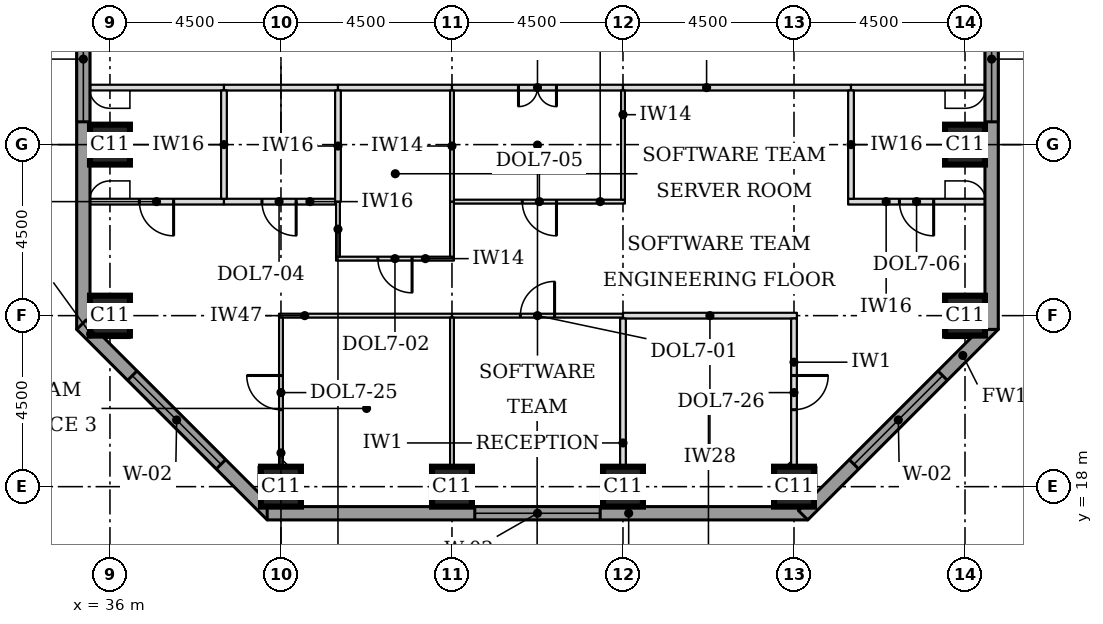
"""IFC4 building model, lengths in metres.
Left out: names, types, materials, properties, quantities, classifications, styles, units other than length and angle.
Written with IfcOpenShell. Run it as: python <this file> out.ifc"""

import sys

from ifc_helpers import new_model, si_unit, direction, frame, frame_2d, origin, origin_2d, place, context, subcontext, project, spatial, rectangle, extrude, element, fill, save


model = new_model("IFC4")
c1 = context("Model", 3, precision=1e-05, world=origin(), true_north=direction((0.0, 1.0)))
c2 = subcontext(c1, "Body", "Model", "MODEL_VIEW")
j1 = project(units=[si_unit("LENGTHUNIT", "METRE"), si_unit("PLANEANGLEUNIT", "RADIAN")], contexts=[c1])
p1 = place(None, origin())
s1 = spatial("IfcSite", under=j1, at=p1, CompositionType="ELEMENT")
p2 = place(p1, origin())
s2 = spatial("IfcBuilding", under=s1, at=p2, CompositionType="ELEMENT")
p3 = place(p2, frame((0.0, 0.0, 130.7)))
s3 = spatial("IfcBuildingStorey", under=s2, at=p3, CompositionType="ELEMENT", Elevation=130.7)
for number, where, z_axis, x_axis in (
    (1, (40.5, 18.0, 0.0), (0.0, 0.0, 1.0), (1.0, 0.0, 0.0)),
    (2, (45.0, 18.0, 0.0), (0.0, 0.0, 1.0), (1.0, 0.0, 0.0)),
    (3, (49.5, 18.0, 0.0), (0.0, 0.0, 1.0), (1.0, 0.0, 0.0)),
    (4, (54.0, 18.0, 0.0), (0.0, 0.0, 1.0), (1.0, 0.0, 0.0)),
    (5, (36.0, 22.5, 0.0), (0.0, 0.0, 1.0), (1.0, 0.0, 0.0)),
    (6, (58.5, 22.5, 0.0), (0.0, 0.0, 1.0), (1.0, 0.0, 0.0)),
    (7, (36.0, 27.0, 0.0), (0.0, 0.0, 1.0), (1.0, 0.0, 0.0)),
    (8, (58.5, 27.0, 0.0), (0.0, 0.0, 1.0), (1.0, 0.0, 0.0)),
):
    element("IfcColumn", number, at=place(p3, frame(where, z_axis=z_axis, x_axis=x_axis)), inside=s3, PredefinedType="COLUMN", context=c2, shape_type="SweptSolid", body=[
        extrude(rectangle(XDim=1.05, YDim=1.05, at=origin_2d()), origin(), (0.0, 0.0, 1.0), 3.7),
    ])
p4 = place(p3, frame((35.3, 39.975, 0.0), z_axis=(0.0, 0.0, 1.0), x_axis=(0.0, -1.0, 0.0)))
e9 = element("IfcWall", 9, at=p4, inside=s3, PredefinedType="STANDARD", context=c2, shape_type="SweptSolid", body=[
    extrude(rectangle(XDim=17.837, YDim=0.35, at=frame_2d((8.919, 0.0))), origin(), (0.0, 0.0, 1.0), 3.525),
])
p5 = place(p4, frame((0.5, 0.0, 0.9)))
e10 = element("IfcOpeningElement", 10, at=p5, cuts=e9, PredefinedType="OPENING", context=c2, shape_type="SweptSolid", body=[
    extrude(rectangle(XDim=3.3, YDim=1.9, at=frame_2d((1.65, 0.95))), frame((0.0, 0.185, 0.0), z_axis=(0.0, -1.0, 0.0), x_axis=(1.0, 0.0, 0.0)), (0.0, 0.0, 1.0), 0.37),
])
p6 = place(p4, frame((9.075, 0.0, 0.9)))
e11 = element("IfcOpeningElement", 11, at=p6, cuts=e9, PredefinedType="OPENING", context=c2, shape_type="SweptSolid", body=[
    extrude(rectangle(XDim=3.3, YDim=1.9, at=frame_2d((1.65, 0.95))), frame((0.0, 0.185, 0.0), z_axis=(0.0, -1.0, 0.0), x_axis=(1.0, 0.0, 0.0)), (0.0, 0.0, 1.0), 0.37),
])
p7 = place(p3, frame((35.249, 22.261, 0.0), z_axis=(0.0, 0.0, 1.0), x_axis=(0.707106781187, -0.707106781187, 0.0)))
e12 = element("IfcWall", 12, at=p7, inside=s3, PredefinedType="STANDARD", context=c2, shape_type="SweptSolid", body=[
    extrude(rectangle(XDim=7.089, YDim=0.35, at=frame_2d((3.544, 0.0))), origin(), (0.0, 0.0, 1.0), 3.525),
])
p8 = place(p7, frame((1.894, 0.0, 0.9)))
e13 = element("IfcOpeningElement", 13, at=p8, cuts=e12, PredefinedType="OPENING", context=c2, shape_type="SweptSolid", body=[
    extrude(rectangle(XDim=3.3, YDim=1.9, at=frame_2d((1.65, 0.95))), frame((0.0, 0.185, 0.0), z_axis=(0.0, -1.0, 0.0), x_axis=(1.0, 0.0, 0.0)), (0.0, 0.0, 1.0), 0.37),
])
p9 = place(p3, frame((40.138, 17.3, 0.0), z_axis=(0.0, 0.0, 1.0), x_axis=(1.0, 0.0, 0.0)))
e14 = element("IfcWall", 14, at=p9, inside=s3, PredefinedType="STANDARD", context=c2, shape_type="SweptSolid", body=[
    extrude(rectangle(XDim=14.225, YDim=0.35, at=frame_2d((7.112, 0.0))), origin(), (0.0, 0.0, 1.0), 3.525),
])
p10 = place(p9, frame((5.462, 0.0, 0.9)))
e15 = element("IfcOpeningElement", 15, at=p10, cuts=e14, PredefinedType="OPENING", context=c2, shape_type="SweptSolid", body=[
    extrude(rectangle(XDim=3.3, YDim=1.9, at=frame_2d((1.65, 0.95))), frame((0.0, 0.185, 0.0), z_axis=(0.0, -1.0, 0.0), x_axis=(1.0, 0.0, 0.0)), (0.0, 0.0, 1.0), 0.37),
])
p11 = place(p3, frame((54.239, 17.249, 0.0), z_axis=(0.0, 0.0, 1.0), x_axis=(0.707106781187, 0.707106781187, 0.0)))
e16 = element("IfcWall", 16, at=p11, inside=s3, PredefinedType="STANDARD", context=c2, shape_type="SweptSolid", body=[
    extrude(rectangle(XDim=7.089, YDim=0.35, at=frame_2d((3.544, 0.0))), origin(), (0.0, 0.0, 1.0), 3.525),
])
p12 = place(p11, frame((1.894, 0.0, 0.9)))
e17 = element("IfcOpeningElement", 17, at=p12, cuts=e16, PredefinedType="OPENING", context=c2, shape_type="SweptSolid", body=[
    extrude(rectangle(XDim=3.3, YDim=1.9, at=frame_2d((1.65, 0.95))), frame((0.0, 0.185, 0.0), z_axis=(0.0, -1.0, 0.0), x_axis=(1.0, 0.0, 0.0)), (0.0, 0.0, 1.0), 0.37),
])
p13 = place(p3, frame((59.2, 22.138, 0.0), z_axis=(0.0, 0.0, 1.0), x_axis=(0.0, 1.0, 0.0)))
e18 = element("IfcWall", 18, at=p13, inside=s3, PredefinedType="STANDARD", context=c2, shape_type="SweptSolid", body=[
    extrude(rectangle(XDim=17.837, YDim=0.35, at=frame_2d((8.919, 0.0))), origin(), (0.0, 0.0, 1.0), 3.525),
])
p14 = place(p13, frame((5.462, 0.0, 0.9)))
e19 = element("IfcOpeningElement", 19, at=p14, cuts=e18, PredefinedType="OPENING", context=c2, shape_type="SweptSolid", body=[
    extrude(rectangle(XDim=3.3, YDim=1.9, at=frame_2d((1.65, 0.95))), frame((0.0, 0.185, 0.0), z_axis=(0.0, -1.0, 0.0), x_axis=(1.0, 0.0, 0.0)), (0.0, 0.0, 1.0), 0.37),
])
p15 = place(p13, frame((14.037, 0.0, 0.9)))
e20 = element("IfcOpeningElement", 20, at=p15, cuts=e18, PredefinedType="OPENING", context=c2, shape_type="SweptSolid", body=[
    extrude(rectangle(XDim=3.3, YDim=1.9, at=frame_2d((1.65, 0.95))), frame((0.0, 0.185, 0.0), z_axis=(0.0, -1.0, 0.0), x_axis=(1.0, 0.0, 0.0)), (0.0, 0.0, 1.0), 0.37),
])
p16 = place(p3, frame((40.45, 22.5, 0.0), z_axis=(0.0, 0.0, 1.0), x_axis=(1.0, 0.0, 0.0)))
e21 = element("IfcWall", 21, at=p16, inside=s3, PredefinedType="PARTITIONING", context=c2, shape_type="SweptSolid", body=[
    extrude(rectangle(XDim=4.55, YDim=0.1, at=frame_2d((2.275, 0.0))), origin(), (0.0, 0.0, 1.0), 2.55),
])
p17 = place(p3, frame((45.0, 22.5, 0.0), z_axis=(0.0, 0.0, 1.0), x_axis=(1.0, 0.0, 0.0)))
e22 = element("IfcWall", 22, at=p17, inside=s3, PredefinedType="PARTITIONING", context=c2, shape_type="SweptSolid", body=[
    extrude(rectangle(XDim=4.5, YDim=0.1, at=frame_2d((2.25, 0.0))), origin(), (0.0, 0.0, 1.0), 2.55),
])
p18 = place(p17, frame((1.8, 0.0, 0.0)))
e23 = element("IfcOpeningElement", 23, at=p18, cuts=e22, PredefinedType="OPENING", context=c2, shape_type="SweptSolid", body=[
    extrude(rectangle(XDim=0.9, YDim=2.1, at=frame_2d((0.45, 1.05))), frame((0.0, 0.06, 0.0), z_axis=(0.0, -1.0, 0.0), x_axis=(1.0, 0.0, 0.0)), (0.0, 0.0, 1.0), 0.12),
])
p19 = place(p3, frame((49.5, 22.5, 0.0), z_axis=(0.0, 0.0, 1.0), x_axis=(1.0, 0.0, 0.0)))
e24 = element("IfcWall", 24, at=p19, inside=s3, PredefinedType="PARTITIONING", context=c2, shape_type="SweptSolid", body=[
    extrude(rectangle(XDim=4.575, YDim=0.15, at=frame_2d((2.288, 0.0))), origin(), (0.0, 0.0, 1.0), 2.55),
])
p20 = place(p3, frame((41.95, 24.0, 0.0), z_axis=(0.0, 0.0, 1.0), x_axis=(1.0, 0.0, 0.0)))
e25 = element("IfcWall", 25, at=p20, inside=s3, PredefinedType="PARTITIONING", context=c2, shape_type="SweptSolid", body=[
    extrude(rectangle(XDim=3.1, YDim=0.1, at=frame_2d((1.55, 0.0))), origin(), (0.0, 0.0, 1.0), 3.55),
])
p21 = place(p20, frame((1.1, 0.0, 0.0)))
e26 = element("IfcOpeningElement", 26, at=p21, cuts=e25, PredefinedType="OPENING", context=c2, shape_type="SweptSolid", body=[
    extrude(rectangle(XDim=0.9, YDim=2.1, at=frame_2d((0.45, 1.05))), frame((0.0, 0.06, 0.0), z_axis=(0.0, -1.0, 0.0), x_axis=(1.0, 0.0, 0.0)), (0.0, 0.0, 1.0), 0.12),
])
p22 = place(p3, frame((35.475, 25.5, 0.0), z_axis=(0.0, 0.0, 1.0), x_axis=(1.0, 0.0, 0.0)))
e27 = element("IfcWall", 27, at=p22, inside=s3, PredefinedType="PARTITIONING", context=c2, shape_type="SweptSolid", body=[
    extrude(rectangle(XDim=3.525, YDim=0.15, at=frame_2d((1.762, 0.0))), origin(), (0.0, 0.0, 1.0), 3.55),
])
p23 = place(p22, frame((1.3, 0.0, 0.0)))
e28 = element("IfcOpeningElement", 28, at=p23, cuts=e27, PredefinedType="OPENING", context=c2, shape_type="SweptSolid", body=[
    extrude(rectangle(XDim=0.9, YDim=2.1, at=frame_2d((0.45, 1.05))), frame((0.0, 0.085, 0.0), z_axis=(0.0, -1.0, 0.0), x_axis=(1.0, 0.0, 0.0)), (0.0, 0.0, 1.0), 0.17),
])
p24 = place(p3, frame((39.0, 25.5, 0.0), z_axis=(0.0, 0.0, 1.0), x_axis=(1.0, 0.0, 0.0)))
e29 = element("IfcWall", 29, at=p24, inside=s3, PredefinedType="PARTITIONING", context=c2, shape_type="SweptSolid", body=[
    extrude(rectangle(XDim=2.925, YDim=0.15, at=frame_2d((1.462, 0.0))), origin(), (0.0, 0.0, 1.0), 3.55),
])
p25 = place(p24, frame((1.0, 0.0, 0.0)))
e30 = element("IfcOpeningElement", 30, at=p25, cuts=e29, PredefinedType="OPENING", context=c2, shape_type="SweptSolid", body=[
    extrude(rectangle(XDim=0.9, YDim=2.1, at=frame_2d((0.45, 1.05))), frame((0.0, 0.085, 0.0), z_axis=(0.0, -1.0, 0.0), x_axis=(1.0, 0.0, 0.0)), (0.0, 0.0, 1.0), 0.17),
])
p26 = place(p3, frame((45.05, 25.5, 0.0), z_axis=(0.0, 0.0, 1.0), x_axis=(1.0, 0.0, 0.0)))
e31 = element("IfcWall", 31, at=p26, inside=s3, PredefinedType="PARTITIONING", context=c2, shape_type="SweptSolid", body=[
    extrude(rectangle(XDim=4.5, YDim=0.1, at=frame_2d((2.25, 0.0))), origin(), (0.0, 0.0, 1.0), 3.55),
])
p27 = place(p26, frame((1.8, 0.0, 0.0)))
e32 = element("IfcOpeningElement", 32, at=p27, cuts=e31, PredefinedType="OPENING", context=c2, shape_type="SweptSolid", body=[
    extrude(rectangle(XDim=0.9, YDim=2.1, at=frame_2d((0.45, 1.05))), frame((0.0, 0.06, 0.0), z_axis=(0.0, -1.0, 0.0), x_axis=(1.0, 0.0, 0.0)), (0.0, 0.0, 1.0), 0.12),
])
p28 = place(p3, frame((55.425, 25.5, 0.0), z_axis=(0.0, 0.0, 1.0), x_axis=(1.0, 0.0, 0.0)))
e33 = element("IfcWall", 33, at=p28, inside=s3, PredefinedType="PARTITIONING", context=c2, shape_type="SweptSolid", body=[
    extrude(rectangle(XDim=3.6, YDim=0.15, at=frame_2d((1.8, 0.0))), origin(), (0.0, 0.0, 1.0), 3.55),
])
p29 = place(p28, frame((1.35, 0.0, 0.0)))
e34 = element("IfcOpeningElement", 34, at=p29, cuts=e33, PredefinedType="OPENING", context=c2, shape_type="SweptSolid", body=[
    extrude(rectangle(XDim=0.9, YDim=2.1, at=frame_2d((0.45, 1.05))), frame((0.0, 0.085, 0.0), z_axis=(0.0, -1.0, 0.0), x_axis=(1.0, 0.0, 0.0)), (0.0, 0.0, 1.0), 0.17),
])
p30 = place(p3, frame((35.475, 28.5, 0.0), z_axis=(0.0, 0.0, 1.0), x_axis=(1.0, 0.0, 0.0)))
e35 = element("IfcWall", 35, at=p30, inside=s3, PredefinedType="PARTITIONING", context=c2, shape_type="SweptSolid", body=[
    extrude(rectangle(XDim=3.525, YDim=0.15, at=frame_2d((1.762, 0.0))), origin(), (0.0, 0.0, 1.0), 3.55),
])
for number, where, z_axis, x_axis in (
    (36, (39.0, 28.5, 0.0), (0.0, 0.0, 1.0), (1.0, 0.0, 0.0)),
    (37, (42.0, 28.5, 0.0), (0.0, 0.0, 1.0), (1.0, 0.0, 0.0)),
):
    element("IfcWall", number, at=place(p3, frame(where, z_axis=z_axis, x_axis=x_axis)), inside=s3, PredefinedType="PARTITIONING", context=c2, shape_type="SweptSolid", body=[
        extrude(rectangle(XDim=3.0, YDim=0.15, at=frame_2d((1.5, 0.0))), origin(), (0.0, 0.0, 1.0), 3.55),
    ])
p31 = place(p3, frame((45.0, 28.5, 0.0), z_axis=(0.0, 0.0, 1.0), x_axis=(1.0, 0.0, 0.0)))
e38 = element("IfcWall", 38, at=p31, inside=s3, PredefinedType="PARTITIONING", context=c2, shape_type="SweptSolid", body=[
    extrude(rectangle(XDim=4.5, YDim=0.15, at=frame_2d((2.25, 0.0))), origin(), (0.0, 0.0, 1.0), 3.55),
])
p32 = place(p31, frame((1.75, 0.0, 0.0)))
e39 = element("IfcOpeningElement", 39, at=p32, cuts=e38, PredefinedType="OPENING", context=c2, shape_type="SweptSolid", body=[
    extrude(rectangle(XDim=1.0, YDim=2.1, at=frame_2d((0.5, 1.05))), frame((0.0, 0.085, 0.0), z_axis=(0.0, -1.0, 0.0), x_axis=(1.0, 0.0, 0.0)), (0.0, 0.0, 1.0), 0.17),
])
p33 = place(p3, frame((49.5, 28.5, 0.0), z_axis=(0.0, 0.0, 1.0), x_axis=(1.0, 0.0, 0.0)))
e40 = element("IfcWall", 40, at=p33, inside=s3, PredefinedType="PARTITIONING", context=c2, shape_type="SweptSolid", body=[
    extrude(rectangle(XDim=6.0, YDim=0.15, at=frame_2d((3.0, 0.0))), origin(), (0.0, 0.0, 1.0), 3.55),
])
p34 = place(p3, frame((55.5, 28.5, 0.0), z_axis=(0.0, 0.0, 1.0), x_axis=(1.0, 0.0, 0.0)))
e41 = element("IfcWall", 41, at=p34, inside=s3, PredefinedType="PARTITIONING", context=c2, shape_type="SweptSolid", body=[
    extrude(rectangle(XDim=3.525, YDim=0.15, at=frame_2d((1.762, 0.0))), origin(), (0.0, 0.0, 1.0), 3.55),
])
p35 = place(p3, frame((45.0, 17.475, 0.0), z_axis=(0.0, 0.0, 1.0), x_axis=(0.0, 1.0, 0.0)))
e42 = element("IfcWall", 42, at=p35, inside=s3, PredefinedType="PARTITIONING", context=c2, shape_type="SweptSolid", body=[
    extrude(rectangle(XDim=4.975, YDim=0.1, at=frame_2d((2.487, 0.0))), origin(), (0.0, 0.0, 1.0), 3.55),
])
p36 = place(p3, frame((49.5, 17.475, 0.0), z_axis=(0.0, 0.0, 1.0), x_axis=(0.0, 1.0, 0.0)))
e43 = element("IfcWall", 43, at=p36, inside=s3, PredefinedType="PARTITIONING", context=c2, shape_type="SweptSolid", body=[
    extrude(rectangle(XDim=4.95, YDim=0.15, at=frame_2d((2.475, 0.0))), origin(), (0.0, 0.0, 1.0), 3.55),
])
p37 = place(p3, frame((40.5, 18.525, 0.0), z_axis=(0.0, 0.0, 1.0), x_axis=(0.0, 1.0, 0.0)))
e44 = element("IfcWall", 44, at=p37, inside=s3, PredefinedType="PARTITIONING", context=c2, shape_type="SweptSolid", body=[
    extrude(rectangle(XDim=3.925, YDim=0.1, at=frame_2d((1.962, 0.0))), origin(), (0.0, 0.0, 1.0), 3.55),
])
p38 = place(p37, frame((1.5, 0.0, 0.0)))
e45 = element("IfcOpeningElement", 45, at=p38, cuts=e44, PredefinedType="OPENING", context=c2, shape_type="SweptSolid", body=[
    extrude(rectangle(XDim=0.9, YDim=2.1, at=frame_2d((0.45, 1.05))), frame((0.0, 0.06, 0.0), z_axis=(0.0, -1.0, 0.0), x_axis=(1.0, 0.0, 0.0)), (0.0, 0.0, 1.0), 0.12),
])
p39 = place(p3, frame((54.0, 18.525, 0.0), z_axis=(0.0, 0.0, 1.0), x_axis=(0.0, 1.0, 0.0)))
e46 = element("IfcWall", 46, at=p39, inside=s3, PredefinedType="PARTITIONING", context=c2, shape_type="SweptSolid", body=[
    extrude(rectangle(XDim=3.9, YDim=0.15, at=frame_2d((1.95, 0.0))), origin(), (0.0, 0.0, 1.0), 3.55),
])
p40 = place(p39, frame((1.5, 0.0, 0.0)))
e47 = element("IfcOpeningElement", 47, at=p40, cuts=e46, PredefinedType="OPENING", context=c2, shape_type="SweptSolid", body=[
    extrude(rectangle(XDim=0.9, YDim=2.1, at=frame_2d((0.45, 1.05))), frame((0.0, 0.085, 0.0), z_axis=(0.0, -1.0, 0.0), x_axis=(1.0, 0.0, 0.0)), (0.0, 0.0, 1.0), 0.17),
])
for number, where, z_axis, x_axis in (
    (48, (42.0, 24.05, 0.0), (0.0, 0.0, 1.0), (0.0, 1.0, 0.0)),
    (49, (45.0, 24.05, 0.0), (0.0, 0.0, 1.0), (0.0, 1.0, 0.0)),
):
    element("IfcWall", number, at=place(p3, frame(where, z_axis=z_axis, x_axis=x_axis)), inside=s3, PredefinedType="PARTITIONING", context=c2, shape_type="SweptSolid", body=[
        extrude(rectangle(XDim=1.45, YDim=0.1, at=frame_2d((0.725, 0.0))), origin(), (0.0, 0.0, 1.0), 3.55),
    ])
p41 = place(p3, frame((42.0, 25.5, 0.0), z_axis=(0.0, 0.0, 1.0), x_axis=(0.0, 1.0, 0.0)))
e50 = element("IfcWall", 50, at=p41, inside=s3, PredefinedType="PARTITIONING", context=c2, shape_type="SweptSolid", body=[
    extrude(rectangle(XDim=2.925, YDim=0.15, at=frame_2d((1.462, 0.0))), origin(), (0.0, 0.0, 1.0), 3.55),
])
p42 = place(p3, frame((45.0, 25.5, 0.0), z_axis=(0.0, 0.0, 1.0), x_axis=(0.0, 1.0, 0.0)))
e51 = element("IfcWall", 51, at=p42, inside=s3, PredefinedType="PARTITIONING", context=c2, shape_type="SweptSolid", body=[
    extrude(rectangle(XDim=2.925, YDim=0.1, at=frame_2d((1.462, 0.0))), origin(), (0.0, 0.0, 1.0), 3.55),
])
p43 = place(p3, frame((49.5, 25.55, 0.0), z_axis=(0.0, 0.0, 1.0), x_axis=(0.0, 1.0, 0.0)))
e52 = element("IfcWall", 52, at=p43, inside=s3, PredefinedType="PARTITIONING", context=c2, shape_type="SweptSolid", body=[
    extrude(rectangle(XDim=2.875, YDim=0.1, at=frame_2d((1.438, 0.0))), origin(), (0.0, 0.0, 1.0), 3.55),
])
for number, where, z_axis, x_axis in (
    (53, (39.0, 25.575, 0.0), (0.0, 0.0, 1.0), (0.0, 1.0, 0.0)),
    (54, (55.5, 25.575, 0.0), (0.0, 0.0, 1.0), (0.0, 1.0, 0.0)),
):
    element("IfcWall", number, at=place(p3, frame(where, z_axis=z_axis, x_axis=x_axis)), inside=s3, PredefinedType="PARTITIONING", context=c2, shape_type="SweptSolid", body=[
        extrude(rectangle(XDim=2.85, YDim=0.15, at=frame_2d((1.425, 0.0))), origin(), (0.0, 0.0, 1.0), 3.55),
    ])
p44 = place(p6, origin())
e55 = element("IfcWindow", 55, at=p44, inside=s3, PartitioningType="SINGLE_PANEL", PredefinedType="WINDOW", context=c2, shape_type="SweptSolid", body=[
    extrude(rectangle(XDim=3.3, YDim=1.9, at=frame_2d((1.65, 0.95))), frame((0.0, 0.085, 0.0), z_axis=(0.0, -1.0, 0.0), x_axis=(1.0, 0.0, 0.0)), (0.0, 0.0, 1.0), 0.06),
])
fill(e11, e55)
p45 = place(p8, origin())
e56 = element("IfcWindow", 56, at=p45, inside=s3, PartitioningType="SINGLE_PANEL", PredefinedType="WINDOW", context=c2, shape_type="SweptSolid", body=[
    extrude(rectangle(XDim=3.3, YDim=1.9, at=frame_2d((1.65, 0.95))), frame((0.0, 0.085, 0.0), z_axis=(0.0, -1.0, 0.0), x_axis=(1.0, 0.0, 0.0)), (0.0, 0.0, 1.0), 0.06),
])
fill(e13, e56)
p46 = place(p10, origin())
e57 = element("IfcWindow", 57, at=p46, inside=s3, PartitioningType="SINGLE_PANEL", PredefinedType="WINDOW", context=c2, shape_type="SweptSolid", body=[
    extrude(rectangle(XDim=3.3, YDim=1.9, at=frame_2d((1.65, 0.95))), frame((0.0, 0.085, 0.0), z_axis=(0.0, -1.0, 0.0), x_axis=(1.0, 0.0, 0.0)), (0.0, 0.0, 1.0), 0.06),
])
fill(e15, e57)
p47 = place(p12, origin())
e58 = element("IfcWindow", 58, at=p47, inside=s3, PartitioningType="SINGLE_PANEL", PredefinedType="WINDOW", context=c2, shape_type="SweptSolid", body=[
    extrude(rectangle(XDim=3.3, YDim=1.9, at=frame_2d((1.65, 0.95))), frame((0.0, 0.085, 0.0), z_axis=(0.0, -1.0, 0.0), x_axis=(1.0, 0.0, 0.0)), (0.0, 0.0, 1.0), 0.06),
])
fill(e17, e58)
p48 = place(p14, origin())
e59 = element("IfcWindow", 59, at=p48, inside=s3, PartitioningType="SINGLE_PANEL", PredefinedType="WINDOW", context=c2, shape_type="SweptSolid", body=[
    extrude(rectangle(XDim=3.3, YDim=1.9, at=frame_2d((1.65, 0.95))), frame((0.0, 0.085, 0.0), z_axis=(0.0, -1.0, 0.0), x_axis=(1.0, 0.0, 0.0)), (0.0, 0.0, 1.0), 0.06),
])
fill(e19, e59)
p49 = place(p32, frame((1.0, 0.0, 0.0), z_axis=(0.0, 0.0, 1.0), x_axis=(-1.0, 0.0, 0.0)))
e60 = element("IfcDoor", 60, at=p49, inside=s3, OperationType="DOUBLE_DOOR_SINGLE_SWING", PredefinedType="DOOR", context=c2, shape_type="SweptSolid", body=[
    extrude(rectangle(XDim=1.0, YDim=2.1, at=frame_2d((0.5, 1.05))), frame((0.0, 0.025, 0.0), z_axis=(0.0, -1.0, 0.0), x_axis=(1.0, 0.0, 0.0)), (0.0, 0.0, 1.0), 0.05),
])
fill(e39, e60)
p50 = place(p27, frame((0.9, 0.0, 0.0), z_axis=(0.0, 0.0, 1.0), x_axis=(-1.0, 0.0, 0.0)))
e61 = element("IfcDoor", 61, at=p50, inside=s3, OperationType="SINGLE_SWING_LEFT", PredefinedType="DOOR", context=c2, shape_type="SweptSolid", body=[
    extrude(rectangle(XDim=0.9, YDim=2.1, at=frame_2d((0.45, 1.05))), frame((0.0, 0.025, 0.0), z_axis=(0.0, -1.0, 0.0), x_axis=(1.0, 0.0, 0.0)), (0.0, 0.0, 1.0), 0.05),
])
fill(e32, e61)
p51 = place(p25, frame((0.9, 0.0, 0.0), z_axis=(0.0, 0.0, 1.0), x_axis=(-1.0, 0.0, 0.0)))
e62 = element("IfcDoor", 62, at=p51, inside=s3, OperationType="SINGLE_SWING_LEFT", PredefinedType="DOOR", context=c2, shape_type="SweptSolid", body=[
    extrude(rectangle(XDim=0.9, YDim=2.1, at=frame_2d((0.45, 1.05))), frame((0.0, 0.025, 0.0), z_axis=(0.0, -1.0, 0.0), x_axis=(1.0, 0.0, 0.0)), (0.0, 0.0, 1.0), 0.05),
])
fill(e30, e62)
p52 = place(p38, origin())
e63 = element("IfcDoor", 63, at=p52, inside=s3, OperationType="SINGLE_SWING_RIGHT", PredefinedType="DOOR", context=c2, shape_type="SweptSolid", body=[
    extrude(rectangle(XDim=0.9, YDim=2.1, at=frame_2d((0.45, 1.05))), frame((0.0, 0.025, 0.0), z_axis=(0.0, -1.0, 0.0), x_axis=(1.0, 0.0, 0.0)), (0.0, 0.0, 1.0), 0.05),
])
fill(e45, e63)
p53 = place(p18, origin())
e64 = element("IfcDoor", 64, at=p53, inside=s3, OperationType="SINGLE_SWING_RIGHT", PredefinedType="DOOR", context=c2, shape_type="SweptSolid", body=[
    extrude(rectangle(XDim=0.9, YDim=2.1, at=frame_2d((0.45, 1.05))), frame((0.0, 0.025, 0.0), z_axis=(0.0, -1.0, 0.0), x_axis=(1.0, 0.0, 0.0)), (0.0, 0.0, 1.0), 0.05),
])
fill(e23, e64)
p54 = place(p29, frame((0.9, 0.0, 0.0), z_axis=(0.0, 0.0, 1.0), x_axis=(-1.0, 0.0, 0.0)))
e65 = element("IfcDoor", 65, at=p54, inside=s3, OperationType="SINGLE_SWING_LEFT", PredefinedType="DOOR", context=c2, shape_type="SweptSolid", body=[
    extrude(rectangle(XDim=0.9, YDim=2.1, at=frame_2d((0.45, 1.05))), frame((0.0, 0.025, 0.0), z_axis=(0.0, -1.0, 0.0), x_axis=(1.0, 0.0, 0.0)), (0.0, 0.0, 1.0), 0.05),
])
fill(e34, e65)
p55 = place(p40, frame((0.9, 0.0, 0.0), z_axis=(0.0, 0.0, 1.0), x_axis=(-1.0, 0.0, 0.0)))
e66 = element("IfcDoor", 66, at=p55, inside=s3, OperationType="SINGLE_SWING_LEFT", PredefinedType="DOOR", context=c2, shape_type="SweptSolid", body=[
    extrude(rectangle(XDim=0.9, YDim=2.1, at=frame_2d((0.45, 1.05))), frame((0.0, 0.025, 0.0), z_axis=(0.0, -1.0, 0.0), x_axis=(1.0, 0.0, 0.0)), (0.0, 0.0, 1.0), 0.05),
])
fill(e47, e66)
p56 = place(p21, frame((0.9, 0.0, 0.0), z_axis=(0.0, 0.0, 1.0), x_axis=(-1.0, 0.0, 0.0)))
e67 = element("IfcDoor", 67, at=p56, inside=s3, OperationType="SINGLE_SWING_LEFT", PredefinedType="DOOR", context=c2, shape_type="SweptSolid", body=[
    extrude(rectangle(XDim=0.9, YDim=2.1, at=frame_2d((0.45, 1.05))), frame((0.0, 0.025, 0.0), z_axis=(0.0, -1.0, 0.0), x_axis=(1.0, 0.0, 0.0)), (0.0, 0.0, 1.0), 0.05),
])
fill(e26, e67)
p57 = place(p23, frame((0.9, 0.0, 0.0), z_axis=(0.0, 0.0, 1.0), x_axis=(-1.0, 0.0, 0.0)))
e68 = element("IfcDoor", 68, at=p57, inside=s3, OperationType="SINGLE_SWING_LEFT", PredefinedType="DOOR", context=c2, shape_type="SweptSolid", body=[
    extrude(rectangle(XDim=0.9, YDim=2.1, at=frame_2d((0.45, 1.05))), frame((0.0, 0.025, 0.0), z_axis=(0.0, -1.0, 0.0), x_axis=(1.0, 0.0, 0.0)), (0.0, 0.0, 1.0), 0.05),
])
fill(e28, e68)
save(model, sys.argv[1])
